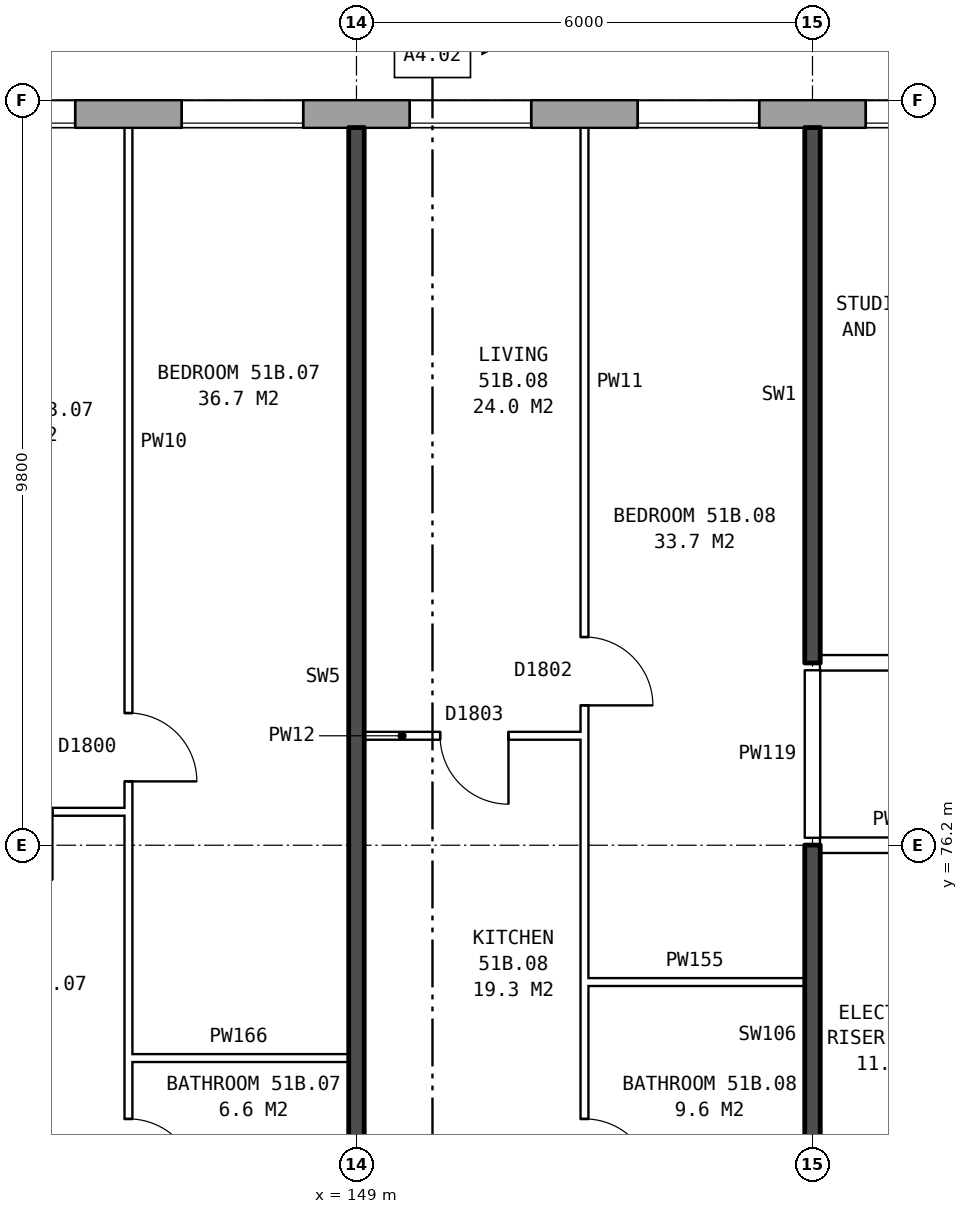
"""IFC4 building model, lengths in metres.
Left out: names, types, materials, properties, quantities, classifications, styles, units other than length and angle.
Written with IfcOpenShell. Run it as: python <this file> out.ifc"""

import sys

from ifc_helpers import new_model, si_unit, direction, frame, frame_2d, origin, place, context, subcontext, project, spatial, rectangle, extrude, element, fill, save


model = new_model("IFC4")
c1 = context("Model", 3, precision=1e-05, world=origin(), true_north=direction((0.0, 1.0)))
c2 = subcontext(c1, "Body", "Model", "MODEL_VIEW")
j1 = project(units=[si_unit("LENGTHUNIT", "METRE"), si_unit("PLANEANGLEUNIT", "RADIAN")], contexts=[c1])
p1 = place(None, origin())
s1 = spatial("IfcSite", under=j1, at=p1, CompositionType="ELEMENT")
p2 = place(p1, origin())
s2 = spatial("IfcBuilding", under=s1, at=p2, CompositionType="ELEMENT")
p3 = place(p2, frame((0.0, 0.0, 182.0)))
s3 = spatial("IfcBuildingStorey", under=s2, at=p3, CompositionType="ELEMENT", Elevation=182.0)
p4 = place(p3, frame((167.175, 85.82, 0.0), z_axis=(0.0, 0.0, 1.0), x_axis=(-1.0, 0.0, 0.0)))
e1 = element("IfcWall", 1, at=p4, inside=s3, PredefinedType="STANDARD", context=c2, shape_type="SweptSolid", body=[
    extrude(rectangle(XDim=33.101, YDim=0.36, at=frame_2d((16.55, 0.0))), origin(), (0.0, 0.0, 1.0), 2.85),
])
p5 = place(p4, frame((0.875, 0.0, 0.8)))
e2 = element("IfcOpeningElement", 2, at=p5, cuts=e1, PredefinedType="OPENING", context=c2, shape_type="SweptSolid", body=[
    extrude(rectangle(XDim=1.6, YDim=1.8, at=frame_2d((0.8, 0.9))), frame((0.0, 0.19, 0.0), z_axis=(0.0, -1.0, 0.0), x_axis=(1.0, 0.0, 0.0)), (0.0, 0.0, 1.0), 0.38),
])
p6 = place(p4, frame((3.875, 0.0, 0.8)))
e3 = element("IfcOpeningElement", 3, at=p6, cuts=e1, PredefinedType="OPENING", context=c2, shape_type="SweptSolid", body=[
    extrude(rectangle(XDim=1.6, YDim=1.8, at=frame_2d((0.8, 0.9))), frame((0.0, 0.19, 0.0), z_axis=(0.0, -1.0, 0.0), x_axis=(1.0, 0.0, 0.0)), (0.0, 0.0, 1.0), 0.38),
])
p7 = place(p4, frame((6.375, 0.0, 1.5)))
e4 = element("IfcOpeningElement", 4, at=p7, cuts=e1, PredefinedType="OPENING", context=c2, shape_type="SweptSolid", body=[
    extrude(rectangle(XDim=0.6, YDim=0.9, at=frame_2d((0.3, 0.45))), frame((0.0, 0.19, 0.0), z_axis=(0.0, -1.0, 0.0), x_axis=(1.0, 0.0, 0.0)), (0.0, 0.0, 1.0), 0.38),
])
p8 = place(p4, frame((9.875, 0.0, 0.8)))
e5 = element("IfcOpeningElement", 5, at=p8, cuts=e1, PredefinedType="OPENING", context=c2, shape_type="SweptSolid", body=[
    extrude(rectangle(XDim=1.6, YDim=1.8, at=frame_2d((0.8, 0.9))), frame((0.0, 0.19, 0.0), z_axis=(0.0, -1.0, 0.0), x_axis=(1.0, 0.0, 0.0)), (0.0, 0.0, 1.0), 0.38),
])
p9 = place(p4, frame((12.875, 0.0, 0.8)))
e6 = element("IfcOpeningElement", 6, at=p9, cuts=e1, PredefinedType="OPENING", context=c2, shape_type="SweptSolid", body=[
    extrude(rectangle(XDim=1.6, YDim=1.8, at=frame_2d((0.8, 0.9))), frame((0.0, 0.19, 0.0), z_axis=(0.0, -1.0, 0.0), x_axis=(1.0, 0.0, 0.0)), (0.0, 0.0, 1.0), 0.38),
])
p10 = place(p4, frame((15.875, 0.0, 0.8)))
e7 = element("IfcOpeningElement", 7, at=p10, cuts=e1, PredefinedType="OPENING", context=c2, shape_type="SweptSolid", body=[
    extrude(rectangle(XDim=1.6, YDim=1.8, at=frame_2d((0.8, 0.9))), frame((0.0, 0.19, 0.0), z_axis=(0.0, -1.0, 0.0), x_axis=(1.0, 0.0, 0.0)), (0.0, 0.0, 1.0), 0.38),
])
p11 = place(p4, frame((18.875, 0.0, 0.8)))
e8 = element("IfcOpeningElement", 8, at=p11, cuts=e1, PredefinedType="OPENING", context=c2, shape_type="SweptSolid", body=[
    extrude(rectangle(XDim=1.6, YDim=1.8, at=frame_2d((0.8, 0.9))), frame((0.0, 0.19, 0.0), z_axis=(0.0, -1.0, 0.0), x_axis=(1.0, 0.0, 0.0)), (0.0, 0.0, 1.0), 0.38),
])
p12 = place(p4, frame((21.875, 0.0, 0.8)))
e9 = element("IfcOpeningElement", 9, at=p12, cuts=e1, PredefinedType="OPENING", context=c2, shape_type="SweptSolid", body=[
    extrude(rectangle(XDim=1.6, YDim=1.8, at=frame_2d((0.8, 0.9))), frame((0.0, 0.19, 0.0), z_axis=(0.0, -1.0, 0.0), x_axis=(1.0, 0.0, 0.0)), (0.0, 0.0, 1.0), 0.38),
])
p13 = place(p4, frame((25.975, 0.0, 1.7)))
e10 = element("IfcOpeningElement", 10, at=p13, cuts=e1, PredefinedType="OPENING", context=c2, shape_type="SweptSolid", body=[
    extrude(rectangle(XDim=0.6, YDim=0.9, at=frame_2d((0.3, 0.45))), frame((0.0, 0.19, 0.0), z_axis=(0.0, -1.0, 0.0), x_axis=(1.0, 0.0, 0.0)), (0.0, 0.0, 1.0), 0.38),
])
p14 = place(p4, frame((27.875, 0.0, 0.8)))
e11 = element("IfcOpeningElement", 11, at=p14, cuts=e1, PredefinedType="OPENING", context=c2, shape_type="SweptSolid", body=[
    extrude(rectangle(XDim=1.6, YDim=1.8, at=frame_2d((0.8, 0.9))), frame((0.0, 0.19, 0.0), z_axis=(0.0, -1.0, 0.0), x_axis=(1.0, 0.0, 0.0)), (0.0, 0.0, 1.0), 0.38),
])
p15 = place(p4, frame((30.875, 0.0, 0.8)))
e12 = element("IfcOpeningElement", 12, at=p15, cuts=e1, PredefinedType="OPENING", context=c2, shape_type="SweptSolid", body=[
    extrude(rectangle(XDim=1.6, YDim=1.8, at=frame_2d((0.8, 0.9))), frame((0.0, 0.19, 0.0), z_axis=(0.0, -1.0, 0.0), x_axis=(1.0, 0.0, 0.0)), (0.0, 0.0, 1.0), 0.38),
])
p16 = place(p4, frame((8.175, 0.0, 0.8)))
e13 = element("IfcOpeningElement", 13, at=p16, cuts=e1, PredefinedType="OPENING", context=c2, shape_type="SweptSolid", body=[
    extrude(rectangle(XDim=1.4, YDim=0.9, at=frame_2d((0.7, 0.45))), frame((0.0, 0.19, 0.0), z_axis=(0.0, -1.0, 0.0), x_axis=(1.0, 0.0, 0.0)), (0.0, 0.0, 1.0), 0.38),
])
p17 = place(p4, frame((26.875, 0.0, 0.8)))
e14 = element("IfcOpeningElement", 14, at=p17, cuts=e1, PredefinedType="OPENING", context=c2, shape_type="SweptSolid", body=[
    extrude(rectangle(XDim=0.6, YDim=1.8, at=frame_2d((0.3, 0.9))), frame((0.0, 0.19, 0.0), z_axis=(0.0, -1.0, 0.0), x_axis=(1.0, 0.0, 0.0)), (0.0, 0.0, 1.0), 0.38),
])
for number, where, z_axis, x_axis in (
    (15, (146.0, 73.4, 0.0), (0.0, 0.0, 1.0), (1.0, 0.0, 0.0)),
    (16, (152.0, 74.4, 0.0), (0.0, 0.0, 1.0), (1.0, 0.0, 0.0)),
):
    element("IfcWall", number, at=place(p3, frame(where, z_axis=z_axis, x_axis=x_axis)), inside=s3, PredefinedType="PARTITIONING", context=c2, shape_type="SweptSolid", body=[
        extrude(rectangle(XDim=2.9, YDim=0.1, at=frame_2d((1.45, 0.0))), origin(), (0.0, 0.0, 1.0), 2.85),
    ])
p18 = place(p3, frame((155.1, 76.2, 0.0), z_axis=(0.0, 0.0, 1.0), x_axis=(1.0, 0.0, 0.0)))
e17 = element("IfcWall", 17, at=p18, inside=s3, PredefinedType="PARTITIONING", context=c2, shape_type="SweptSolid", body=[
    extrude(rectangle(XDim=2.14, YDim=0.2, at=frame_2d((1.07, 0.0))), origin(), (0.0, 0.0, 1.0), 2.85),
])
p19 = place(p3, frame((143.1, 76.64, 0.0), z_axis=(0.0, 0.0, 1.0), x_axis=(1.0, 0.0, 0.0)))
e18 = element("IfcWall", 18, at=p19, inside=s3, PredefinedType="PARTITIONING", context=c2, shape_type="SweptSolid", body=[
    extrude(rectangle(XDim=2.9, YDim=0.1, at=frame_2d((1.45, 0.0))), origin(), (0.0, 0.0, 1.0), 2.85),
])
p20 = place(p19, frame((1.0, 0.0, 0.0)))
e19 = element("IfcOpeningElement", 19, at=p20, cuts=e18, PredefinedType="OPENING", context=c2, shape_type="SweptSolid", body=[
    extrude(rectangle(XDim=0.9, YDim=2.1, at=frame_2d((0.45, 1.05))), frame((0.0, 0.06, 0.0), z_axis=(0.0, -1.0, 0.0), x_axis=(1.0, 0.0, 0.0)), (0.0, 0.0, 1.0), 0.12),
])
p21 = place(p3, frame((149.1, 77.64, 0.0), z_axis=(0.0, 0.0, 1.0), x_axis=(1.0, 0.0, 0.0)))
e20 = element("IfcWall", 20, at=p21, inside=s3, PredefinedType="PARTITIONING", context=c2, shape_type="SweptSolid", body=[
    extrude(rectangle(XDim=2.9, YDim=0.1, at=frame_2d((1.45, 0.0))), origin(), (0.0, 0.0, 1.0), 2.85),
])
p22 = place(p21, frame((1.0, 0.0, 0.0)))
e21 = element("IfcOpeningElement", 21, at=p22, cuts=e20, PredefinedType="OPENING", context=c2, shape_type="SweptSolid", body=[
    extrude(rectangle(XDim=0.9, YDim=2.1, at=frame_2d((0.45, 1.05))), frame((0.0, 0.06, 0.0), z_axis=(0.0, -1.0, 0.0), x_axis=(1.0, 0.0, 0.0)), (0.0, 0.0, 1.0), 0.12),
])
p23 = place(p3, frame((155.1, 78.6, 0.0), z_axis=(0.0, 0.0, 1.0), x_axis=(1.0, 0.0, 0.0)))
e22 = element("IfcWall", 22, at=p23, inside=s3, PredefinedType="PARTITIONING", context=c2, shape_type="SweptSolid", body=[
    extrude(rectangle(XDim=14.79, YDim=0.2, at=frame_2d((7.395, 0.0))), origin(), (0.0, 0.0, 1.0), 2.85),
])
p24 = place(p23, frame((1.45, 0.0, 0.0)))
e23 = element("IfcOpeningElement", 23, at=p24, cuts=e22, PredefinedType="OPENING", context=c2, shape_type="SweptSolid", body=[
    extrude(rectangle(XDim=1.0, YDim=2.1, at=frame_2d((0.5, 1.05))), frame((0.0, 0.11, 0.0), z_axis=(0.0, -1.0, 0.0), x_axis=(1.0, 0.0, 0.0)), (0.0, 0.0, 1.0), 0.22),
])
p25 = place(p23, frame((11.045, 0.0, 0.0)))
e24 = element("IfcOpeningElement", 24, at=p25, cuts=e22, PredefinedType="OPENING", context=c2, shape_type="SweptSolid", body=[
    extrude(rectangle(XDim=1.0, YDim=2.1, at=frame_2d((0.5, 1.05))), frame((0.0, 0.11, 0.0), z_axis=(0.0, -1.0, 0.0), x_axis=(1.0, 0.0, 0.0)), (0.0, 0.0, 1.0), 0.22),
])
p26 = place(p3, frame((146.0, 71.3, 0.0), z_axis=(0.0, 0.0, 1.0), x_axis=(0.0, 1.0, 0.0)))
e25 = element("IfcWall", 25, at=p26, inside=s3, PredefinedType="PARTITIONING", context=c2, shape_type="SweptSolid", body=[
    extrude(rectangle(XDim=14.34, YDim=0.1, at=frame_2d((7.17, 0.0))), origin(), (0.0, 0.0, 1.0), 2.85),
])
p27 = place(p26, frame((5.74, 0.0, 0.0)))
e26 = element("IfcOpeningElement", 26, at=p27, cuts=e25, PredefinedType="OPENING", context=c2, shape_type="SweptSolid", body=[
    extrude(rectangle(XDim=0.9, YDim=2.1, at=frame_2d((0.45, 1.05))), frame((0.0, 0.06, 0.0), z_axis=(0.0, -1.0, 0.0), x_axis=(1.0, 0.0, 0.0)), (0.0, 0.0, 1.0), 0.12),
])
p28 = place(p26, frame((0.4, 0.0, 0.0)))
e27 = element("IfcOpeningElement", 27, at=p28, cuts=e25, PredefinedType="OPENING", context=c2, shape_type="SweptSolid", body=[
    extrude(rectangle(XDim=0.9, YDim=2.1, at=frame_2d((0.45, 1.05))), frame((0.0, 0.06, 0.0), z_axis=(0.0, -1.0, 0.0), x_axis=(1.0, 0.0, 0.0)), (0.0, 0.0, 1.0), 0.12),
])
p29 = place(p3, frame((149.0, 71.2, 0.0), z_axis=(0.0, 0.0, 1.0), x_axis=(0.0, 1.0, 0.0)))
e28 = element("IfcWall", 28, at=p29, inside=s3, PredefinedType="SOLIDWALL", context=c2, shape_type="SweptSolid", body=[
    extrude(rectangle(XDim=14.44, YDim=0.2, at=frame_2d((7.22, 0.0))), origin(), (0.0, 0.0, 1.0), 2.85),
])
p30 = place(p3, frame((152.0, 71.3, 0.0), z_axis=(0.0, 0.0, 1.0), x_axis=(0.0, 1.0, 0.0)))
e29 = element("IfcWall", 29, at=p30, inside=s3, PredefinedType="PARTITIONING", context=c2, shape_type="SweptSolid", body=[
    extrude(rectangle(XDim=14.34, YDim=0.1, at=frame_2d((7.17, 0.0))), origin(), (0.0, 0.0, 1.0), 2.85),
])
p31 = place(p30, frame((6.74, 0.0, 0.0)))
e30 = element("IfcOpeningElement", 30, at=p31, cuts=e29, PredefinedType="OPENING", context=c2, shape_type="SweptSolid", body=[
    extrude(rectangle(XDim=0.9, YDim=2.1, at=frame_2d((0.45, 1.05))), frame((0.0, 0.06, 0.0), z_axis=(0.0, -1.0, 0.0), x_axis=(1.0, 0.0, 0.0)), (0.0, 0.0, 1.0), 0.12),
])
p32 = place(p30, frame((0.4, 0.0, 0.0)))
e31 = element("IfcOpeningElement", 31, at=p32, cuts=e29, PredefinedType="OPENING", context=c2, shape_type="SweptSolid", body=[
    extrude(rectangle(XDim=0.9, YDim=2.1, at=frame_2d((0.45, 1.05))), frame((0.0, 0.06, 0.0), z_axis=(0.0, -1.0, 0.0), x_axis=(1.0, 0.0, 0.0)), (0.0, 0.0, 1.0), 0.12),
])
p33 = place(p3, frame((155.0, 71.2, 0.0), z_axis=(0.0, 0.0, 1.0), x_axis=(0.0, 1.0, 0.0)))
e32 = element("IfcWall", 32, at=p33, inside=s3, PredefinedType="SOLIDWALL", context=c2, shape_type="SweptSolid", body=[
    extrude(rectangle(XDim=5.0, YDim=0.2, at=frame_2d((2.5, 0.0))), origin(), (0.0, 0.0, 1.0), 2.85),
])
p34 = place(p3, frame((155.0, 76.3, 0.0), z_axis=(0.0, 0.0, 1.0), x_axis=(0.0, 1.0, 0.0)))
e33 = element("IfcWall", 33, at=p34, inside=s3, PredefinedType="PARTITIONING", context=c2, shape_type="SweptSolid", body=[
    extrude(rectangle(XDim=2.2, YDim=0.2, at=frame_2d((1.1, 0.0))), origin(), (0.0, 0.0, 1.0), 2.85),
])
p35 = place(p3, frame((155.0, 78.6, 0.0), z_axis=(0.0, 0.0, 1.0), x_axis=(0.0, 1.0, 0.0)))
e34 = element("IfcWall", 34, at=p35, inside=s3, PredefinedType="SOLIDWALL", context=c2, shape_type="SweptSolid", body=[
    extrude(rectangle(XDim=7.04, YDim=0.2, at=frame_2d((3.52, 0.0))), origin(), (0.0, 0.0, 1.0), 2.85),
])
p36 = place(p8, origin())
e35 = element("IfcWindow", 35, at=p36, inside=s3, PartitioningType="SINGLE_PANEL", PredefinedType="WINDOW", context=c2, shape_type="SweptSolid", body=[
    extrude(rectangle(XDim=1.6, YDim=1.8, at=frame_2d((0.8, 0.9))), frame((0.0, 0.15, 0.0), z_axis=(0.0, -1.0, 0.0), x_axis=(1.0, 0.0, 0.0)), (0.0, 0.0, 1.0), 0.06),
])
fill(e5, e35)
p37 = place(p9, origin())
e36 = element("IfcWindow", 36, at=p37, inside=s3, PartitioningType="SINGLE_PANEL", PredefinedType="WINDOW", context=c2, shape_type="SweptSolid", body=[
    extrude(rectangle(XDim=1.6, YDim=1.8, at=frame_2d((0.8, 0.9))), frame((0.0, 0.15, 0.0), z_axis=(0.0, -1.0, 0.0), x_axis=(1.0, 0.0, 0.0)), (0.0, 0.0, 1.0), 0.06),
])
fill(e6, e36)
p38 = place(p10, origin())
e37 = element("IfcWindow", 37, at=p38, inside=s3, PartitioningType="SINGLE_PANEL", PredefinedType="WINDOW", context=c2, shape_type="SweptSolid", body=[
    extrude(rectangle(XDim=1.6, YDim=1.8, at=frame_2d((0.8, 0.9))), frame((0.0, 0.15, 0.0), z_axis=(0.0, -1.0, 0.0), x_axis=(1.0, 0.0, 0.0)), (0.0, 0.0, 1.0), 0.06),
])
fill(e7, e37)
p39 = place(p11, origin())
e38 = element("IfcWindow", 38, at=p39, inside=s3, PartitioningType="SINGLE_PANEL", PredefinedType="WINDOW", context=c2, shape_type="SweptSolid", body=[
    extrude(rectangle(XDim=1.6, YDim=1.8, at=frame_2d((0.8, 0.9))), frame((0.0, 0.15, 0.0), z_axis=(0.0, -1.0, 0.0), x_axis=(1.0, 0.0, 0.0)), (0.0, 0.0, 1.0), 0.06),
])
fill(e8, e38)
p40 = place(p12, origin())
e39 = element("IfcWindow", 39, at=p40, inside=s3, PartitioningType="SINGLE_PANEL", PredefinedType="WINDOW", context=c2, shape_type="SweptSolid", body=[
    extrude(rectangle(XDim=1.6, YDim=1.8, at=frame_2d((0.8, 0.9))), frame((0.0, 0.15, 0.0), z_axis=(0.0, -1.0, 0.0), x_axis=(1.0, 0.0, 0.0)), (0.0, 0.0, 1.0), 0.06),
])
fill(e9, e39)
p41 = place(p27, frame((0.9, 0.0, 0.0), z_axis=(0.0, 0.0, 1.0), x_axis=(-1.0, 0.0, 0.0)))
e40 = element("IfcDoor", 40, at=p41, inside=s3, OperationType="SINGLE_SWING_RIGHT", PredefinedType="DOOR", context=c2, shape_type="SweptSolid", body=[
    extrude(rectangle(XDim=0.9, YDim=2.1, at=frame_2d((0.45, 1.05))), frame((0.0, 0.025, 0.0), z_axis=(0.0, -1.0, 0.0), x_axis=(1.0, 0.0, 0.0)), (0.0, 0.0, 1.0), 0.05),
])
fill(e26, e40)
p42 = place(p28, frame((0.9, 0.0, 0.0), z_axis=(0.0, 0.0, 1.0), x_axis=(-1.0, 0.0, 0.0)))
e41 = element("IfcDoor", 41, at=p42, inside=s3, OperationType="SINGLE_SWING_RIGHT", PredefinedType="DOOR", context=c2, shape_type="SweptSolid", body=[
    extrude(rectangle(XDim=0.9, YDim=2.1, at=frame_2d((0.45, 1.05))), frame((0.0, 0.025, 0.0), z_axis=(0.0, -1.0, 0.0), x_axis=(1.0, 0.0, 0.0)), (0.0, 0.0, 1.0), 0.05),
])
fill(e27, e41)
p43 = place(p31, frame((0.9, 0.0, 0.0), z_axis=(0.0, 0.0, 1.0), x_axis=(-1.0, 0.0, 0.0)))
e42 = element("IfcDoor", 42, at=p43, inside=s3, OperationType="SINGLE_SWING_RIGHT", PredefinedType="DOOR", context=c2, shape_type="SweptSolid", body=[
    extrude(rectangle(XDim=0.9, YDim=2.1, at=frame_2d((0.45, 1.05))), frame((0.0, 0.025, 0.0), z_axis=(0.0, -1.0, 0.0), x_axis=(1.0, 0.0, 0.0)), (0.0, 0.0, 1.0), 0.05),
])
fill(e30, e42)
p44 = place(p22, frame((0.9, 0.0, 0.0), z_axis=(0.0, 0.0, 1.0), x_axis=(-1.0, 0.0, 0.0)))
e43 = element("IfcDoor", 43, at=p44, inside=s3, OperationType="SINGLE_SWING_LEFT", PredefinedType="DOOR", context=c2, shape_type="SweptSolid", body=[
    extrude(rectangle(XDim=0.9, YDim=2.1, at=frame_2d((0.45, 1.05))), frame((0.0, 0.025, 0.0), z_axis=(0.0, -1.0, 0.0), x_axis=(1.0, 0.0, 0.0)), (0.0, 0.0, 1.0), 0.05),
])
fill(e21, e43)
p45 = place(p32, frame((0.9, 0.0, 0.0), z_axis=(0.0, 0.0, 1.0), x_axis=(-1.0, 0.0, 0.0)))
e44 = element("IfcDoor", 44, at=p45, inside=s3, OperationType="SINGLE_SWING_RIGHT", PredefinedType="DOOR", context=c2, shape_type="SweptSolid", body=[
    extrude(rectangle(XDim=0.9, YDim=2.1, at=frame_2d((0.45, 1.05))), frame((0.0, 0.025, 0.0), z_axis=(0.0, -1.0, 0.0), x_axis=(1.0, 0.0, 0.0)), (0.0, 0.0, 1.0), 0.05),
])
fill(e31, e44)
save(model, sys.argv[1])
